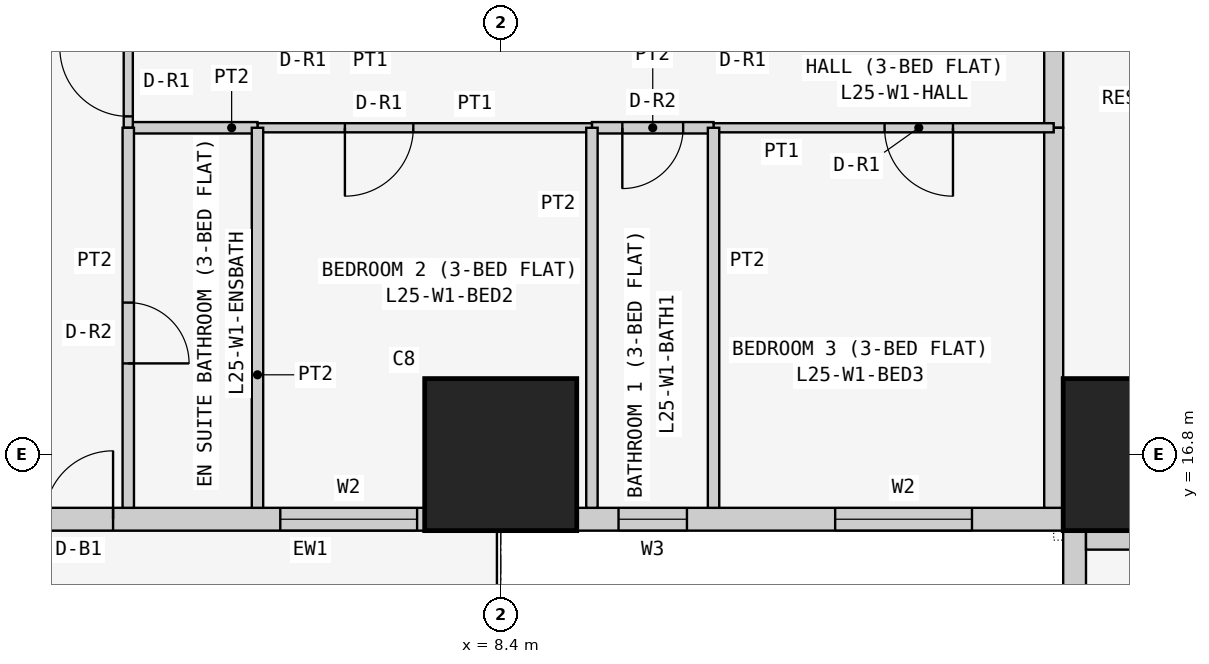
"""IFC4 building model, lengths in metres.
Left out: names, types, materials, properties, quantities, classifications, styles, units other than length and angle.
Written with IfcOpenShell. Run it as: python <this file> out.ifc"""

import sys

from ifc_helpers import new_model, si_unit, direction, frame, frame_2d, origin, origin_2d, place, context, subcontext, project, spatial, rectangle, extrude, element, fill, save


model = new_model("IFC4")
c1 = context("Model", 3, precision=1e-05, world=origin(), true_north=direction((0.0, 1.0)))
c2 = subcontext(c1, "Body", "Model", "MODEL_VIEW")
j1 = project(units=[si_unit("LENGTHUNIT", "METRE"), si_unit("PLANEANGLEUNIT", "RADIAN")], contexts=[c1])
p1 = place(None, origin())
s1 = spatial("IfcSite", under=j1, at=p1, CompositionType="ELEMENT")
p2 = place(p1, origin())
s2 = spatial("IfcBuilding", under=s1, at=p2, CompositionType="ELEMENT")
p3 = place(p2, frame((0.0, 0.0, 99.3)))
s3 = spatial("IfcBuildingStorey", under=s2, at=p3, CompositionType="ELEMENT", Elevation=99.3)
for number, where, z_axis, x_axis in (
    (1, (8.4, 16.8, 0.0), (0.0, 0.0, 1.0), (1.0, 0.0, 0.0)),
    (2, (16.8, 16.8, 0.0), (0.0, 0.0, 1.0), (1.0, 0.0, 0.0)),
):
    element("IfcColumn", number, at=place(p3, frame(where, z_axis=z_axis, x_axis=x_axis)), inside=s3, PredefinedType="COLUMN", context=c2, shape_type="SweptSolid", body=[
        extrude(rectangle(XDim=2.0, YDim=2.0, at=origin_2d()), origin(), (0.0, 0.0, 1.0), 3.6),
    ])
p4 = place(p3, frame((0.4, 15.95, 0.0), z_axis=(0.0, 0.0, 1.0), x_axis=(1.0, 0.0, 0.0)))
e3 = element("IfcWall", 3, at=p4, inside=s3, PredefinedType="SOLIDWALL", context=c2, shape_type="SweptSolid", body=[
    extrude(rectangle(XDim=15.7, YDim=0.3, at=frame_2d((7.85, 0.0))), origin(), (0.0, 0.0, 1.0), 3.35),
])
p5 = place(p4, frame((12.4, 0.0, 0.9)))
e4 = element("IfcOpeningElement", 4, at=p5, cuts=e3, PredefinedType="OPENING", context=c2, shape_type="SweptSolid", body=[
    extrude(rectangle(XDim=1.8, YDim=1.5, at=frame_2d((0.9, 0.75))), frame((0.0, 0.16, 0.0), z_axis=(0.0, -1.0, 0.0), x_axis=(1.0, 0.0, 0.0)), (0.0, 0.0, 1.0), 0.32),
])
p6 = place(p4, frame((9.55, 0.0, 1.5)))
e5 = element("IfcOpeningElement", 5, at=p6, cuts=e3, PredefinedType="OPENING", context=c2, shape_type="SweptSolid", body=[
    extrude(rectangle(XDim=0.9, YDim=0.7, at=frame_2d((0.45, 0.35))), frame((0.0, 0.16, 0.0), z_axis=(0.0, -1.0, 0.0), x_axis=(1.0, 0.0, 0.0)), (0.0, 0.0, 1.0), 0.32),
])
p7 = place(p4, frame((5.1, 0.0, 0.9)))
e6 = element("IfcOpeningElement", 6, at=p7, cuts=e3, PredefinedType="OPENING", context=c2, shape_type="SweptSolid", body=[
    extrude(rectangle(XDim=1.8, YDim=1.5, at=frame_2d((0.9, 0.75))), frame((0.0, 0.16, 0.0), z_axis=(0.0, -1.0, 0.0), x_axis=(1.0, 0.0, 0.0)), (0.0, 0.0, 1.0), 0.32),
])
p8 = place(p4, frame((2.0, 0.0, 0.0)))
e7 = element("IfcOpeningElement", 7, at=p8, cuts=e3, PredefinedType="OPENING", context=c2, shape_type="SweptSolid", body=[
    extrude(rectangle(XDim=0.9, YDim=2.4, at=frame_2d((0.45, 1.2))), frame((0.0, 0.16, 0.0), z_axis=(0.0, -1.0, 0.0), x_axis=(1.0, 0.0, 0.0)), (0.0, 0.0, 1.0), 0.32),
])
p9 = place(p4, frame((0.7, 0.0, 0.9)))
e8 = element("IfcOpeningElement", 8, at=p9, cuts=e3, PredefinedType="OPENING", context=c2, shape_type="SweptSolid", body=[
    extrude(rectangle(XDim=1.2, YDim=1.5, at=frame_2d((0.6, 0.75))), frame((0.0, 0.16, 0.0), z_axis=(0.0, -1.0, 0.0), x_axis=(1.0, 0.0, 0.0)), (0.0, 0.0, 1.0), 0.32),
])
p10 = place(p3, frame((15.95, 15.8, 0.0), z_axis=(0.0, 0.0, 1.0), x_axis=(0.0, -1.0, 0.0)))
e9 = element("IfcWall", 9, at=p10, inside=s3, PredefinedType="SOLIDWALL", context=c2, shape_type="SweptSolid", body=[
    extrude(rectangle(XDim=15.4, YDim=0.3, at=frame_2d((7.7, 0.0))), origin(), (0.0, 0.0, 1.0), 3.35),
])
p11 = place(p10, frame((1.2, 0.0, 0.9)))
e10 = element("IfcOpeningElement", 10, at=p11, cuts=e9, PredefinedType="OPENING", context=c2, shape_type="SweptSolid", body=[
    extrude(rectangle(XDim=1.8, YDim=1.5, at=frame_2d((0.9, 0.75))), frame((0.0, 0.16, 0.0), z_axis=(0.0, -1.0, 0.0), x_axis=(1.0, 0.0, 0.0)), (0.0, 0.0, 1.0), 0.32),
])
p12 = place(p10, frame((4.95, 0.0, 1.5)))
e11 = element("IfcOpeningElement", 11, at=p12, cuts=e9, PredefinedType="OPENING", context=c2, shape_type="SweptSolid", body=[
    extrude(rectangle(XDim=0.9, YDim=0.7, at=frame_2d((0.45, 0.35))), frame((0.0, 0.16, 0.0), z_axis=(0.0, -1.0, 0.0), x_axis=(1.0, 0.0, 0.0)), (0.0, 0.0, 1.0), 0.32),
])
p13 = place(p10, frame((8.5, 0.0, 0.9)))
e12 = element("IfcOpeningElement", 12, at=p13, cuts=e9, PredefinedType="OPENING", context=c2, shape_type="SweptSolid", body=[
    extrude(rectangle(XDim=1.8, YDim=1.5, at=frame_2d((0.9, 0.75))), frame((0.0, 0.16, 0.0), z_axis=(0.0, -1.0, 0.0), x_axis=(1.0, 0.0, 0.0)), (0.0, 0.0, 1.0), 0.32),
])
p14 = place(p10, frame((12.5, 0.0, 0.0)))
e13 = element("IfcOpeningElement", 13, at=p14, cuts=e9, PredefinedType="OPENING", context=c2, shape_type="SweptSolid", body=[
    extrude(rectangle(XDim=0.9, YDim=2.4, at=frame_2d((0.45, 1.2))), frame((0.0, 0.16, 0.0), z_axis=(0.0, -1.0, 0.0), x_axis=(1.0, 0.0, 0.0)), (0.0, 0.0, 1.0), 0.32),
])
p15 = place(p10, frame((13.5, 0.0, 0.9)))
e14 = element("IfcOpeningElement", 14, at=p15, cuts=e9, PredefinedType="OPENING", context=c2, shape_type="SweptSolid", body=[
    extrude(rectangle(XDim=1.2, YDim=1.5, at=frame_2d((0.6, 0.75))), frame((0.0, 0.16, 0.0), z_axis=(0.0, -1.0, 0.0), x_axis=(1.0, 0.0, 0.0)), (0.0, 0.0, 1.0), 0.32),
])
p16 = place(p3, frame((21.1, 15.675, 0.0), z_axis=(0.0, 0.0, 1.0), x_axis=(-1.0, 0.0, 0.0)))
e15 = element("IfcWall", 15, at=p16, inside=s3, PredefinedType="PARTITIONING", context=c2, shape_type="SweptSolid", body=[
    extrude(rectangle(XDim=5.0, YDim=0.25, at=frame_2d((2.5, 0.0))), origin(), (0.0, 0.0, 1.0), 3.35),
])
p17 = place(p3, frame((15.675, 21.1, 0.0), z_axis=(0.0, 0.0, 1.0), x_axis=(0.0, 1.0, 0.0)))
e16 = element("IfcWall", 16, at=p17, inside=s3, PredefinedType="PARTITIONING", context=c2, shape_type="SweptSolid", body=[
    extrude(rectangle(XDim=1.2, YDim=0.25, at=frame_2d((0.6, 0.0))), origin(), (0.0, 0.0, 1.0), 3.35),
])
p18 = place(p3, frame((15.675, 16.1, 0.0), z_axis=(0.0, 0.0, 1.0), x_axis=(0.0, 1.0, 0.0)))
e17 = element("IfcWall", 17, at=p18, inside=s3, PredefinedType="PARTITIONING", context=c2, shape_type="SweptSolid", body=[
    extrude(rectangle(XDim=5.0, YDim=0.25, at=frame_2d((2.5, 0.0))), origin(), (0.0, 0.0, 1.0), 3.35),
])
p19 = place(p3, frame((11.2, 21.1, 0.0), z_axis=(0.0, 0.0, 1.0), x_axis=(1.0, 0.0, 0.0)))
e18 = element("IfcWall", 18, at=p19, inside=s3, PredefinedType="PARTITIONING", context=c2, shape_type="SweptSolid", body=[
    extrude(rectangle(XDim=4.475, YDim=0.12, at=frame_2d((2.238, 0.0))), origin(), (0.0, 0.0, 1.0), 3.35),
])
p20 = place(p19, frame((2.25, 0.0, 0.0)))
e19 = element("IfcOpeningElement", 19, at=p20, cuts=e18, PredefinedType="OPENING", context=c2, shape_type="SweptSolid", body=[
    extrude(rectangle(XDim=0.9, YDim=2.1, at=frame_2d((0.45, 1.05))), frame((0.0, 0.07, 0.0), z_axis=(0.0, -1.0, 0.0), x_axis=(1.0, 0.0, 0.0)), (0.0, 0.0, 1.0), 0.14),
])
p21 = place(p3, frame((9.6, 21.1, 0.0), z_axis=(0.0, 0.0, 1.0), x_axis=(1.0, 0.0, 0.0)))
e20 = element("IfcWall", 20, at=p21, inside=s3, PredefinedType="PARTITIONING", context=c2, shape_type="SweptSolid", body=[
    extrude(rectangle(XDim=1.6, YDim=0.15, at=frame_2d((0.8, 0.0))), origin(), (0.0, 0.0, 1.0), 3.35),
])
p22 = place(p21, frame((0.4, 0.0, 0.0)))
e21 = element("IfcOpeningElement", 21, at=p22, cuts=e20, PredefinedType="OPENING", context=c2, shape_type="SweptSolid", body=[
    extrude(rectangle(XDim=0.8, YDim=2.1, at=frame_2d((0.4, 1.05))), frame((0.0, 0.085, 0.0), z_axis=(0.0, -1.0, 0.0), x_axis=(1.0, 0.0, 0.0)), (0.0, 0.0, 1.0), 0.17),
])
p23 = place(p3, frame((5.2, 21.1, 0.0), z_axis=(0.0, 0.0, 1.0), x_axis=(1.0, 0.0, 0.0)))
e22 = element("IfcWall", 22, at=p23, inside=s3, PredefinedType="PARTITIONING", context=c2, shape_type="SweptSolid", body=[
    extrude(rectangle(XDim=4.4, YDim=0.12, at=frame_2d((2.2, 0.0))), origin(), (0.0, 0.0, 1.0), 3.35),
])
p24 = place(p23, frame((1.15, 0.0, 0.0)))
e23 = element("IfcOpeningElement", 23, at=p24, cuts=e22, PredefinedType="OPENING", context=c2, shape_type="SweptSolid", body=[
    extrude(rectangle(XDim=0.9, YDim=2.1, at=frame_2d((0.45, 1.05))), frame((0.0, 0.07, 0.0), z_axis=(0.0, -1.0, 0.0), x_axis=(1.0, 0.0, 0.0)), (0.0, 0.0, 1.0), 0.14),
])
p25 = place(p3, frame((3.5, 21.1, 0.0), z_axis=(0.0, 0.0, 1.0), x_axis=(1.0, 0.0, 0.0)))
e24 = element("IfcWall", 24, at=p25, inside=s3, PredefinedType="PARTITIONING", context=c2, shape_type="SweptSolid", body=[
    extrude(rectangle(XDim=1.7, YDim=0.15, at=frame_2d((0.85, 0.0))), origin(), (0.0, 0.0, 1.0), 3.35),
])
p26 = place(p3, frame((3.5, 22.3, 0.0), z_axis=(0.0, 0.0, 1.0), x_axis=(0.0, -1.0, 0.0)))
e25 = element("IfcWall", 25, at=p26, inside=s3, PredefinedType="PARTITIONING", context=c2, shape_type="SweptSolid", body=[
    extrude(rectangle(XDim=1.2, YDim=0.12, at=frame_2d((0.6, 0.0))), origin(), (0.0, 0.0, 1.0), 3.35),
])
p27 = place(p26, frame((0.15, 0.0, 0.0)))
e26 = element("IfcOpeningElement", 26, at=p27, cuts=e25, PredefinedType="OPENING", context=c2, shape_type="SweptSolid", body=[
    extrude(rectangle(XDim=0.9, YDim=2.1, at=frame_2d((0.45, 1.05))), frame((0.0, 0.07, 0.0), z_axis=(0.0, -1.0, 0.0), x_axis=(1.0, 0.0, 0.0)), (0.0, 0.0, 1.0), 0.14),
])
for number, where, z_axis, x_axis in (
    (27, (11.2, 21.1, 0.0), (0.0, 0.0, 1.0), (0.0, -1.0, 0.0)),
    (28, (9.6, 21.1, 0.0), (0.0, 0.0, 1.0), (0.0, -1.0, 0.0)),
    (29, (5.2, 21.1, 0.0), (0.0, 0.0, 1.0), (0.0, -1.0, 0.0)),
):
    element("IfcWall", number, at=place(p3, frame(where, z_axis=z_axis, x_axis=x_axis)), inside=s3, PredefinedType="PARTITIONING", context=c2, shape_type="SweptSolid", body=[
        extrude(rectangle(XDim=5.0, YDim=0.15, at=frame_2d((2.5, 0.0))), origin(), (0.0, 0.0, 1.0), 3.35),
    ])
p28 = place(p3, frame((3.5, 21.1, 0.0), z_axis=(0.0, 0.0, 1.0), x_axis=(0.0, -1.0, 0.0)))
e30 = element("IfcWall", 30, at=p28, inside=s3, PredefinedType="PARTITIONING", context=c2, shape_type="SweptSolid", body=[
    extrude(rectangle(XDim=5.0, YDim=0.15, at=frame_2d((2.5, 0.0))), origin(), (0.0, 0.0, 1.0), 3.35),
])
p29 = place(p28, frame((2.3, 0.0, 0.0)))
e31 = element("IfcOpeningElement", 31, at=p29, cuts=e30, PredefinedType="OPENING", context=c2, shape_type="SweptSolid", body=[
    extrude(rectangle(XDim=0.8, YDim=2.1, at=frame_2d((0.4, 1.05))), frame((0.0, 0.085, 0.0), z_axis=(0.0, -1.0, 0.0), x_axis=(1.0, 0.0, 0.0)), (0.0, 0.0, 1.0), 0.17),
])
p30 = place(p5, origin())
e32 = element("IfcWindow", 32, at=p30, inside=s3, PartitioningType="SINGLE_PANEL", PredefinedType="WINDOW", context=c2, shape_type="SweptSolid", body=[
    extrude(rectangle(XDim=1.8, YDim=1.5, at=frame_2d((0.9, 0.75))), frame((0.0, 0.03, 0.0), z_axis=(0.0, -1.0, 0.0), x_axis=(1.0, 0.0, 0.0)), (0.0, 0.0, 1.0), 0.06),
])
fill(e4, e32)
p31 = place(p6, origin())
e33 = element("IfcWindow", 33, at=p31, inside=s3, PartitioningType="SINGLE_PANEL", PredefinedType="WINDOW", context=c2, shape_type="SweptSolid", body=[
    extrude(rectangle(XDim=0.9, YDim=0.7, at=frame_2d((0.45, 0.35))), frame((0.0, 0.03, 0.0), z_axis=(0.0, -1.0, 0.0), x_axis=(1.0, 0.0, 0.0)), (0.0, 0.0, 1.0), 0.06),
])
fill(e5, e33)
p32 = place(p7, origin())
e34 = element("IfcWindow", 34, at=p32, inside=s3, PartitioningType="SINGLE_PANEL", PredefinedType="WINDOW", context=c2, shape_type="SweptSolid", body=[
    extrude(rectangle(XDim=1.8, YDim=1.5, at=frame_2d((0.9, 0.75))), frame((0.0, 0.03, 0.0), z_axis=(0.0, -1.0, 0.0), x_axis=(1.0, 0.0, 0.0)), (0.0, 0.0, 1.0), 0.06),
])
fill(e6, e34)
p33 = place(p8, origin())
e35 = element("IfcDoor", 35, at=p33, inside=s3, OperationType="SINGLE_SWING_RIGHT", PredefinedType="DOOR", context=c2, shape_type="SweptSolid", body=[
    extrude(rectangle(XDim=0.9, YDim=2.4, at=frame_2d((0.45, 1.2))), frame((0.0, 0.025, 0.0), z_axis=(0.0, -1.0, 0.0), x_axis=(1.0, 0.0, 0.0)), (0.0, 0.0, 1.0), 0.05),
])
fill(e7, e35)
p34 = place(p20, frame((0.9, 0.0, 0.0), z_axis=(0.0, 0.0, 1.0), x_axis=(-1.0, 0.0, 0.0)))
e36 = element("IfcDoor", 36, at=p34, inside=s3, OperationType="SINGLE_SWING_LEFT", PredefinedType="DOOR", context=c2, shape_type="SweptSolid", body=[
    extrude(rectangle(XDim=0.9, YDim=2.1, at=frame_2d((0.45, 1.05))), frame((0.0, 0.025, 0.0), z_axis=(0.0, -1.0, 0.0), x_axis=(1.0, 0.0, 0.0)), (0.0, 0.0, 1.0), 0.05),
])
fill(e19, e36)
p35 = place(p22, frame((0.8, 0.0, 0.0), z_axis=(0.0, 0.0, 1.0), x_axis=(-1.0, 0.0, 0.0)))
e37 = element("IfcDoor", 37, at=p35, inside=s3, OperationType="SINGLE_SWING_RIGHT", PredefinedType="DOOR", context=c2, shape_type="SweptSolid", body=[
    extrude(rectangle(XDim=0.8, YDim=2.1, at=frame_2d((0.4, 1.05))), frame((0.0, 0.025, 0.0), z_axis=(0.0, -1.0, 0.0), x_axis=(1.0, 0.0, 0.0)), (0.0, 0.0, 1.0), 0.05),
])
fill(e21, e37)
p36 = place(p24, frame((0.9, 0.0, 0.0), z_axis=(0.0, 0.0, 1.0), x_axis=(-1.0, 0.0, 0.0)))
e38 = element("IfcDoor", 38, at=p36, inside=s3, OperationType="SINGLE_SWING_RIGHT", PredefinedType="DOOR", context=c2, shape_type="SweptSolid", body=[
    extrude(rectangle(XDim=0.9, YDim=2.1, at=frame_2d((0.45, 1.05))), frame((0.0, 0.025, 0.0), z_axis=(0.0, -1.0, 0.0), x_axis=(1.0, 0.0, 0.0)), (0.0, 0.0, 1.0), 0.05),
])
fill(e23, e38)
p37 = place(p27, frame((0.9, 0.0, 0.0), z_axis=(0.0, 0.0, 1.0), x_axis=(-1.0, 0.0, 0.0)))
e39 = element("IfcDoor", 39, at=p37, inside=s3, OperationType="SINGLE_SWING_RIGHT", PredefinedType="DOOR", context=c2, shape_type="SweptSolid", body=[
    extrude(rectangle(XDim=0.9, YDim=2.1, at=frame_2d((0.45, 1.05))), frame((0.0, 0.025, 0.0), z_axis=(0.0, -1.0, 0.0), x_axis=(1.0, 0.0, 0.0)), (0.0, 0.0, 1.0), 0.05),
])
fill(e26, e39)
p38 = place(p29, origin())
e40 = element("IfcDoor", 40, at=p38, inside=s3, OperationType="SINGLE_SWING_RIGHT", PredefinedType="DOOR", context=c2, shape_type="SweptSolid", body=[
    extrude(rectangle(XDim=0.8, YDim=2.1, at=frame_2d((0.4, 1.05))), frame((0.0, 0.025, 0.0), z_axis=(0.0, -1.0, 0.0), x_axis=(1.0, 0.0, 0.0)), (0.0, 0.0, 1.0), 0.05),
])
fill(e31, e40)
save(model, sys.argv[1])
